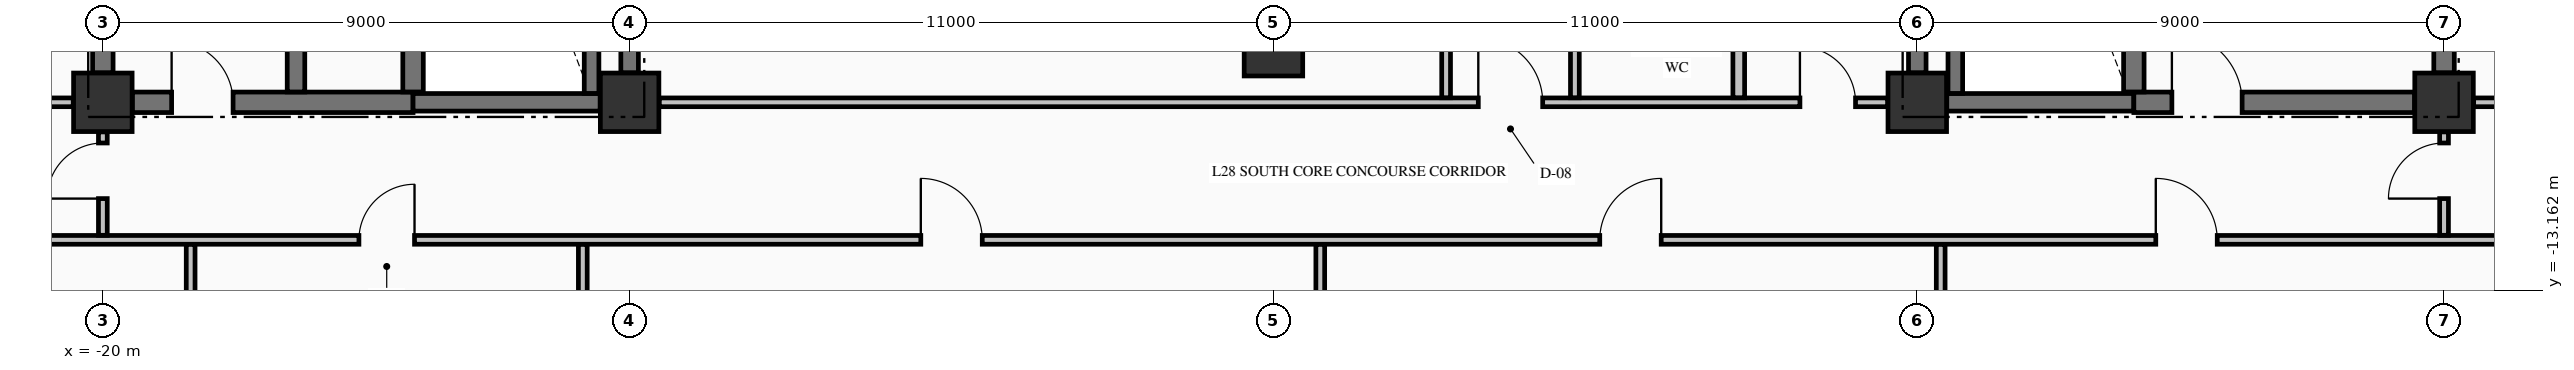
"""IFC4 building model, lengths in metres.
Left out: names, types, materials, properties, quantities, classifications, styles, units other than length and angle.
Written with IfcOpenShell. Run it as: python <this file> out.ifc"""

import sys

from ifc_helpers import new_model, si_unit, direction, frame, frame_2d, origin, origin_2d, place, context, subcontext, project, spatial, rectangle, extrude, element, fill, save


model = new_model("IFC4")
c1 = context("Model", 3, precision=1e-05, world=origin(), true_north=direction((0.0, 1.0)))
c2 = subcontext(c1, "Body", "Model", "MODEL_VIEW")
j1 = project(units=[si_unit("LENGTHUNIT", "METRE"), si_unit("PLANEANGLEUNIT", "RADIAN")], contexts=[c1])
p1 = place(None, origin())
s1 = spatial("IfcSite", under=j1, at=p1, CompositionType="ELEMENT")
p2 = place(p1, origin())
s2 = spatial("IfcBuilding", under=s1, at=p2, CompositionType="ELEMENT")
p3 = place(p2, frame((0.0, 0.0, 112.78)))
s3 = spatial("IfcBuildingStorey", under=s2, at=p3, CompositionType="ELEMENT", Elevation=112.78)
for number, where, z_axis, x_axis in (
    (1, (-20.0, -9.95, -0.25), (0.0, 0.0, 1.0), (1.0, 0.0, 0.0)),
    (2, (-11.0, -9.95, -0.25), (0.0, 0.0, 1.0), (1.0, 0.0, 0.0)),
    (3, (11.0, -9.95, -0.25), (0.0, 0.0, 1.0), (1.0, 0.0, 0.0)),
    (4, (20.0, -9.95, -0.25), (0.0, 0.0, 1.0), (1.0, 0.0, 0.0)),
    (5, (0.0, -9.0, -0.25), (0.0, 0.0, 1.0), (1.0, 0.0, 0.0)),
):
    element("IfcColumn", number, at=place(p3, frame(where, z_axis=z_axis, x_axis=x_axis)), inside=s3, PredefinedType="COLUMN", context=c2, shape_type="SweptSolid", body=[
        extrude(rectangle(XDim=1.0, YDim=1.0, at=origin_2d()), origin(), (0.0, 0.0, 1.0), 3.395),
    ])
p4 = place(p3, frame((-19.496, -9.95, 0.0), z_axis=(0.0, 0.0, 1.0), x_axis=(1.0, 0.0, 0.0)))
e6 = element("IfcWall", 6, at=p4, inside=s3, PredefinedType="SHEAR", context=c2, shape_type="SweptSolid", body=[
    extrude(rectangle(XDim=4.796, YDim=0.35, at=frame_2d((2.398, 0.0))), origin(), (0.0, 0.0, 1.0), 3.145),
])
p5 = place(p4, frame((0.671, 0.0, 0.0)))
e7 = element("IfcOpeningElement", 7, at=p5, cuts=e6, PredefinedType="OPENING", context=c2, shape_type="SweptSolid", body=[
    extrude(rectangle(XDim=1.05, YDim=2.15, at=frame_2d((0.525, 1.075))), frame((0.0, 0.185, 0.0), z_axis=(0.0, -1.0, 0.0), x_axis=(1.0, 0.0, 0.0)), (0.0, 0.0, 1.0), 0.37),
])
for number, where, z_axis, x_axis in (
    (8, (-14.7, -9.95, 0.0), (0.0, 0.0, 1.0), (1.0, 0.0, 0.0)),
    (9, (11.504, -9.95, 0.0), (0.0, 0.0, 1.0), (1.0, 0.0, 0.0)),
):
    element("IfcWall", number, at=place(p3, frame(where, z_axis=z_axis, x_axis=x_axis)), inside=s3, PredefinedType="SHEAR", context=c2, shape_type="SweptSolid", body=[
        extrude(rectangle(XDim=3.196, YDim=0.3, at=frame_2d((1.598, 0.0))), origin(), (0.0, 0.0, 1.0), 3.145),
    ])
p6 = place(p3, frame((14.7, -9.95, 0.0), z_axis=(0.0, 0.0, 1.0), x_axis=(1.0, 0.0, 0.0)))
e10 = element("IfcWall", 10, at=p6, inside=s3, PredefinedType="SHEAR", context=c2, shape_type="SweptSolid", body=[
    extrude(rectangle(XDim=4.796, YDim=0.35, at=frame_2d((2.398, 0.0))), origin(), (0.0, 0.0, 1.0), 3.145),
])
p7 = place(p6, frame((0.65, 0.0, 0.0)))
e11 = element("IfcOpeningElement", 11, at=p7, cuts=e10, PredefinedType="OPENING", context=c2, shape_type="SweptSolid", body=[
    extrude(rectangle(XDim=1.2, YDim=2.15, at=frame_2d((0.6, 1.075))), frame((0.0, 0.185, 0.0), z_axis=(0.0, -1.0, 0.0), x_axis=(1.0, 0.0, 0.0)), (0.0, 0.0, 1.0), 0.37),
])
p8 = place(p3, frame((-22.835, -12.3, 0.0), z_axis=(0.0, 0.0, 1.0), x_axis=(1.0, 0.0, 0.0)))
e12 = element("IfcWall", 12, at=p8, inside=s3, PredefinedType="PARTITIONING", context=c2, shape_type="SweptSolid", body=[
    extrude(rectangle(XDim=50.67, YDim=0.15, at=frame_2d((25.335, 0.0))), origin(), (0.0, 0.0, 1.0), 3.145),
])
p9 = place(p8, frame((7.21, 0.0, 0.0)))
e13 = element("IfcOpeningElement", 13, at=p9, cuts=e12, PredefinedType="OPENING", context=c2, shape_type="SweptSolid", body=[
    extrude(rectangle(XDim=0.95, YDim=2.15, at=frame_2d((0.475, 1.075))), frame((0.0, 0.085, 0.0), z_axis=(0.0, -1.0, 0.0), x_axis=(1.0, 0.0, 0.0)), (0.0, 0.0, 1.0), 0.17),
])
p10 = place(p8, frame((16.81, 0.0, 0.0)))
e14 = element("IfcOpeningElement", 14, at=p10, cuts=e12, PredefinedType="OPENING", context=c2, shape_type="SweptSolid", body=[
    extrude(rectangle(XDim=1.05, YDim=2.15, at=frame_2d((0.525, 1.075))), frame((0.0, 0.085, 0.0), z_axis=(0.0, -1.0, 0.0), x_axis=(1.0, 0.0, 0.0)), (0.0, 0.0, 1.0), 0.17),
])
p11 = place(p8, frame((28.41, 0.0, 0.0)))
e15 = element("IfcOpeningElement", 15, at=p11, cuts=e12, PredefinedType="OPENING", context=c2, shape_type="SweptSolid", body=[
    extrude(rectangle(XDim=1.05, YDim=2.15, at=frame_2d((0.525, 1.075))), frame((0.0, 0.085, 0.0), z_axis=(0.0, -1.0, 0.0), x_axis=(1.0, 0.0, 0.0)), (0.0, 0.0, 1.0), 0.17),
])
p12 = place(p8, frame((37.91, 0.0, 0.0)))
e16 = element("IfcOpeningElement", 16, at=p12, cuts=e12, PredefinedType="OPENING", context=c2, shape_type="SweptSolid", body=[
    extrude(rectangle(XDim=1.05, YDim=2.15, at=frame_2d((0.525, 1.075))), frame((0.0, 0.085, 0.0), z_axis=(0.0, -1.0, 0.0), x_axis=(1.0, 0.0, 0.0)), (0.0, 0.0, 1.0), 0.17),
])
p13 = place(p3, frame((-22.835, -9.95, 0.0), z_axis=(0.0, 0.0, 1.0), x_axis=(1.0, 0.0, 0.0)))
e17 = element("IfcWall", 17, at=p13, inside=s3, PredefinedType="PARTITIONING", context=c2, shape_type="SweptSolid", body=[
    extrude(rectangle(XDim=2.329, YDim=0.15, at=frame_2d((1.165, 0.0))), origin(), (0.0, 0.0, 1.0), 3.145),
])
p14 = place(p13, frame((0.86, 0.0, 0.0)))
e18 = element("IfcOpeningElement", 18, at=p14, cuts=e17, PredefinedType="OPENING", context=c2, shape_type="SweptSolid", body=[
    extrude(rectangle(XDim=0.95, YDim=2.15, at=frame_2d((0.475, 1.075))), frame((0.0, 0.085, 0.0), z_axis=(0.0, -1.0, 0.0), x_axis=(1.0, 0.0, 0.0)), (0.0, 0.0, 1.0), 0.17),
])
p15 = place(p3, frame((-10.494, -9.95, 0.0), z_axis=(0.0, 0.0, 1.0), x_axis=(1.0, 0.0, 0.0)))
e19 = element("IfcWall", 19, at=p15, inside=s3, PredefinedType="PARTITIONING", context=c2, shape_type="SweptSolid", body=[
    extrude(rectangle(XDim=20.988, YDim=0.15, at=frame_2d((10.494, 0.0))), origin(), (0.0, 0.0, 1.0), 3.145),
])
p16 = place(p15, frame((13.994, 0.0, 0.0)))
e20 = element("IfcOpeningElement", 20, at=p16, cuts=e19, PredefinedType="OPENING", context=c2, shape_type="SweptSolid", body=[
    extrude(rectangle(XDim=1.1, YDim=2.15, at=frame_2d((0.55, 1.075))), frame((0.0, 0.085, 0.0), z_axis=(0.0, -1.0, 0.0), x_axis=(1.0, 0.0, 0.0)), (0.0, 0.0, 1.0), 0.17),
])
p17 = place(p15, frame((19.489, 0.0, 0.0)))
e21 = element("IfcOpeningElement", 21, at=p17, cuts=e19, PredefinedType="OPENING", context=c2, shape_type="SweptSolid", body=[
    extrude(rectangle(XDim=0.95, YDim=2.15, at=frame_2d((0.475, 1.075))), frame((0.0, 0.085, 0.0), z_axis=(0.0, -1.0, 0.0), x_axis=(1.0, 0.0, 0.0)), (0.0, 0.0, 1.0), 0.17),
])
p18 = place(p3, frame((20.506, -9.95, 0.0), z_axis=(0.0, 0.0, 1.0), x_axis=(1.0, 0.0, 0.0)))
e22 = element("IfcWall", 22, at=p18, inside=s3, PredefinedType="PARTITIONING", context=c2, shape_type="SweptSolid", body=[
    extrude(rectangle(XDim=7.329, YDim=0.15, at=frame_2d((3.665, 0.0))), origin(), (0.0, 0.0, 1.0), 3.145),
])
p19 = place(p18, frame((2.994, 0.0, 0.0)))
e23 = element("IfcOpeningElement", 23, at=p19, cuts=e22, PredefinedType="OPENING", context=c2, shape_type="SweptSolid", body=[
    extrude(rectangle(XDim=1.0, YDim=2.15, at=frame_2d((0.5, 1.075))), frame((0.0, 0.085, 0.0), z_axis=(0.0, -1.0, 0.0), x_axis=(1.0, 0.0, 0.0)), (0.0, 0.0, 1.0), 0.17),
])
p20 = place(p3, frame((-20.0, -9.446, 0.0), z_axis=(0.0, 0.0, 1.0), x_axis=(0.0, 1.0, 0.0)))
e24 = element("IfcWall", 24, at=p20, inside=s3, PredefinedType="SHEAR", context=c2, shape_type="SweptSolid", body=[
    extrude(rectangle(XDim=8.942, YDim=0.35, at=frame_2d((4.471, 0.0))), origin(), (0.0, 0.0, 1.0), 3.145),
])
p21 = place(p3, frame((-16.7, -9.773, 0.0), z_axis=(0.0, 0.0, 1.0), x_axis=(0.0, 1.0, 0.0)))
e25 = element("IfcWall", 25, at=p21, inside=s3, PredefinedType="SHEAR", context=c2, shape_type="SweptSolid", body=[
    extrude(rectangle(XDim=9.371, YDim=0.3, at=frame_2d((4.686, 0.0))), origin(), (0.0, 0.0, 1.0), 3.145),
])
p22 = place(p3, frame((-14.7, -9.773, 0.0), z_axis=(0.0, 0.0, 1.0), x_axis=(0.0, 1.0, 0.0)))
e26 = element("IfcWall", 26, at=p22, inside=s3, PredefinedType="SHEAR", context=c2, shape_type="SweptSolid", body=[
    extrude(rectangle(XDim=9.371, YDim=0.35, at=frame_2d((4.686, 0.0))), origin(), (0.0, 0.0, 1.0), 3.145),
])
p23 = place(p3, frame((-11.65, -9.798, 0.0), z_axis=(0.0, 0.0, 1.0), x_axis=(0.0, 1.0, 0.0)))
e27 = element("IfcWall", 27, at=p23, inside=s3, PredefinedType="SOLIDWALL", context=c2, shape_type="SweptSolid", body=[
    extrude(rectangle(XDim=9.396, YDim=0.25, at=frame_2d((4.698, 0.0))), origin(), (0.0, 0.0, 1.0), 3.145),
])
for number, where, z_axis, x_axis in (
    (28, (-11.0, -9.446, 0.0), (0.0, 0.0, 1.0), (0.0, 1.0, 0.0)),
    (29, (11.0, -9.446, 0.0), (0.0, 0.0, 1.0), (0.0, 1.0, 0.0)),
):
    element("IfcWall", number, at=place(p3, frame(where, z_axis=z_axis, x_axis=x_axis)), inside=s3, PredefinedType="SHEAR", context=c2, shape_type="SweptSolid", body=[
        extrude(rectangle(XDim=8.942, YDim=0.3, at=frame_2d((4.471, 0.0))), origin(), (0.0, 0.0, 1.0), 3.145),
    ])
p24 = place(p3, frame((11.65, -9.798, 0.0), z_axis=(0.0, 0.0, 1.0), x_axis=(0.0, 1.0, 0.0)))
e30 = element("IfcWall", 30, at=p24, inside=s3, PredefinedType="SOLIDWALL", context=c2, shape_type="SweptSolid", body=[
    extrude(rectangle(XDim=9.396, YDim=0.25, at=frame_2d((4.698, 0.0))), origin(), (0.0, 0.0, 1.0), 3.145),
])
p25 = place(p3, frame((14.7, -9.773, 0.0), z_axis=(0.0, 0.0, 1.0), x_axis=(0.0, 1.0, 0.0)))
e31 = element("IfcWall", 31, at=p25, inside=s3, PredefinedType="SHEAR", context=c2, shape_type="SweptSolid", body=[
    extrude(rectangle(XDim=9.371, YDim=0.35, at=frame_2d((4.686, 0.0))), origin(), (0.0, 0.0, 1.0), 3.145),
])
p26 = place(p3, frame((20.0, -9.446, 0.0), z_axis=(0.0, 0.0, 1.0), x_axis=(0.0, 1.0, 0.0)))
e32 = element("IfcWall", 32, at=p26, inside=s3, PredefinedType="SHEAR", context=c2, shape_type="SweptSolid", body=[
    extrude(rectangle(XDim=2.269, YDim=0.35, at=frame_2d((1.135, 0.0))), origin(), (0.0, 0.0, 1.0), 3.145),
])
p27 = place(p3, frame((-20.0, -12.222, 0.0), z_axis=(0.0, 0.0, 1.0), x_axis=(0.0, 1.0, 0.0)))
e33 = element("IfcWall", 33, at=p27, inside=s3, PredefinedType="PARTITIONING", context=c2, shape_type="SweptSolid", body=[
    extrude(rectangle(XDim=1.766, YDim=0.15, at=frame_2d((0.883, 0.0))), origin(), (0.0, 0.0, 1.0), 2.635),
])
p28 = place(p27, frame((0.627, 0.0, 0.0)))
e34 = element("IfcOpeningElement", 34, at=p28, cuts=e33, PredefinedType="OPENING", context=c2, shape_type="SweptSolid", body=[
    extrude(rectangle(XDim=0.95, YDim=2.15, at=frame_2d((0.475, 1.075))), frame((0.0, 0.085, 0.0), z_axis=(0.0, -1.0, 0.0), x_axis=(1.0, 0.0, 0.0)), (0.0, 0.0, 1.0), 0.17),
])
p29 = place(p3, frame((-18.5, -20.394, 0.0), z_axis=(0.0, 0.0, 1.0), x_axis=(0.0, 1.0, 0.0)))
e35 = element("IfcWall", 35, at=p29, inside=s3, PredefinedType="PARTITIONING", context=c2, shape_type="SweptSolid", body=[
    extrude(rectangle(XDim=8.016, YDim=0.15, at=frame_2d((4.008, 0.0))), origin(), (0.0, 0.0, 1.0), 3.145),
])
for number, where, z_axis, x_axis in (
    (36, (-11.8, -25.335, 0.0), (0.0, 0.0, 1.0), (0.0, 1.0, 0.0)),
    (37, (0.8, -25.335, 0.0), (0.0, 0.0, 1.0), (0.0, 1.0, 0.0)),
):
    element("IfcWall", number, at=place(p3, frame(where, z_axis=z_axis, x_axis=x_axis)), inside=s3, PredefinedType="PARTITIONING", context=c2, shape_type="SweptSolid", body=[
        extrude(rectangle(XDim=12.957, YDim=0.15, at=frame_2d((6.479, 0.0))), origin(), (0.0, 0.0, 1.0), 3.145),
    ])
p30 = place(p3, frame((2.95, -9.872, 0.0), z_axis=(0.0, 0.0, 1.0), x_axis=(0.0, 1.0, 0.0)))
e38 = element("IfcWall", 38, at=p30, inside=s3, PredefinedType="PARTITIONING", context=c2, shape_type="SweptSolid", body=[
    extrude(rectangle(XDim=9.544, YDim=0.15, at=frame_2d((4.772, 0.0))), origin(), (0.0, 0.0, 1.0), 3.145),
])
p31 = place(p3, frame((5.15, -9.872, 0.0), z_axis=(0.0, 0.0, 1.0), x_axis=(0.0, 1.0, 0.0)))
e39 = element("IfcWall", 39, at=p31, inside=s3, PredefinedType="PARTITIONING", context=c2, shape_type="SweptSolid", body=[
    extrude(rectangle(XDim=4.919, YDim=0.15, at=frame_2d((2.459, 0.0))), origin(), (0.0, 0.0, 1.0), 3.145),
])
p32 = place(p31, frame((1.997, 0.0, 0.0)))
e40 = element("IfcOpeningElement", 40, at=p32, cuts=e39, PredefinedType="OPENING", context=c2, shape_type="SweptSolid", body=[
    extrude(rectangle(XDim=0.95, YDim=2.15, at=frame_2d((0.475, 1.075))), frame((0.0, 0.085, 0.0), z_axis=(0.0, -1.0, 0.0), x_axis=(1.0, 0.0, 0.0)), (0.0, 0.0, 1.0), 0.17),
])
p33 = place(p3, frame((7.95, -9.872, 0.0), z_axis=(0.0, 0.0, 1.0), x_axis=(0.0, 1.0, 0.0)))
e41 = element("IfcWall", 41, at=p33, inside=s3, PredefinedType="PARTITIONING", context=c2, shape_type="SweptSolid", body=[
    extrude(rectangle(XDim=4.919, YDim=0.2, at=frame_2d((2.459, 0.0))), origin(), (0.0, 0.0, 1.0), 3.145),
])
p34 = place(p3, frame((11.4, -24.894, 0.0), z_axis=(0.0, 0.0, 1.0), x_axis=(0.0, 1.0, 0.0)))
e42 = element("IfcWall", 42, at=p34, inside=s3, PredefinedType="PARTITIONING", context=c2, shape_type="SweptSolid", body=[
    extrude(rectangle(XDim=12.516, YDim=0.15, at=frame_2d((6.258, 0.0))), origin(), (0.0, 0.0, 1.0), 3.145),
])
p35 = place(p3, frame((20.0, -12.222, 0.0), z_axis=(0.0, 0.0, 1.0), x_axis=(0.0, 1.0, 0.0)))
e43 = element("IfcWall", 43, at=p35, inside=s3, PredefinedType="PARTITIONING", context=c2, shape_type="SweptSolid", body=[
    extrude(rectangle(XDim=1.766, YDim=0.15, at=frame_2d((0.883, 0.0))), origin(), (0.0, 0.0, 1.0), 2.635),
])
p36 = place(p35, frame((0.627, 0.0, 0.0)))
e44 = element("IfcOpeningElement", 44, at=p36, cuts=e43, PredefinedType="OPENING", context=c2, shape_type="SweptSolid", body=[
    extrude(rectangle(XDim=0.95, YDim=2.15, at=frame_2d((0.475, 1.075))), frame((0.0, 0.085, 0.0), z_axis=(0.0, -1.0, 0.0), x_axis=(1.0, 0.0, 0.0)), (0.0, 0.0, 1.0), 0.17),
])
p37 = place(p5, origin())
e45 = element("IfcDoor", 45, at=p37, inside=s3, OperationType="SINGLE_SWING_LEFT", PredefinedType="DOOR", context=c2, shape_type="SweptSolid", body=[
    extrude(rectangle(XDim=1.05, YDim=2.15, at=frame_2d((0.525, 1.075))), frame((0.0, 0.025, 0.0), z_axis=(0.0, -1.0, 0.0), x_axis=(1.0, 0.0, 0.0)), (0.0, 0.0, 1.0), 0.05),
])
fill(e7, e45)
p38 = place(p7, origin())
e46 = element("IfcDoor", 46, at=p38, inside=s3, OperationType="SINGLE_SWING_LEFT", PredefinedType="DOOR", context=c2, shape_type="SweptSolid", body=[
    extrude(rectangle(XDim=1.2, YDim=2.15, at=frame_2d((0.6, 1.075))), frame((0.0, 0.025, 0.0), z_axis=(0.0, -1.0, 0.0), x_axis=(1.0, 0.0, 0.0)), (0.0, 0.0, 1.0), 0.05),
])
fill(e11, e46)
p39 = place(p16, origin())
e47 = element("IfcDoor", 47, at=p39, inside=s3, OperationType="SINGLE_SWING_LEFT", PredefinedType="DOOR", context=c2, shape_type="SweptSolid", body=[
    extrude(rectangle(XDim=1.1, YDim=2.15, at=frame_2d((0.55, 1.075))), frame((0.0, 0.025, 0.0), z_axis=(0.0, -1.0, 0.0), x_axis=(1.0, 0.0, 0.0)), (0.0, 0.0, 1.0), 0.05),
])
fill(e20, e47)
p40 = place(p9, origin())
e48 = element("IfcDoor", 48, at=p40, inside=s3, OperationType="SINGLE_SWING_RIGHT", PredefinedType="DOOR", context=c2, shape_type="SweptSolid", body=[
    extrude(rectangle(XDim=0.95, YDim=2.15, at=frame_2d((0.475, 1.075))), frame((0.0, 0.025, 0.0), z_axis=(0.0, -1.0, 0.0), x_axis=(1.0, 0.0, 0.0)), (0.0, 0.0, 1.0), 0.05),
])
fill(e13, e48)
p41 = place(p10, origin())
e49 = element("IfcDoor", 49, at=p41, inside=s3, OperationType="SINGLE_SWING_LEFT", PredefinedType="DOOR", context=c2, shape_type="SweptSolid", body=[
    extrude(rectangle(XDim=1.05, YDim=2.15, at=frame_2d((0.525, 1.075))), frame((0.0, 0.025, 0.0), z_axis=(0.0, -1.0, 0.0), x_axis=(1.0, 0.0, 0.0)), (0.0, 0.0, 1.0), 0.05),
])
fill(e14, e49)
p42 = place(p11, origin())
e50 = element("IfcDoor", 50, at=p42, inside=s3, OperationType="SINGLE_SWING_RIGHT", PredefinedType="DOOR", context=c2, shape_type="SweptSolid", body=[
    extrude(rectangle(XDim=1.05, YDim=2.15, at=frame_2d((0.525, 1.075))), frame((0.0, 0.025, 0.0), z_axis=(0.0, -1.0, 0.0), x_axis=(1.0, 0.0, 0.0)), (0.0, 0.0, 1.0), 0.05),
])
fill(e15, e50)
p43 = place(p12, origin())
e51 = element("IfcDoor", 51, at=p43, inside=s3, OperationType="SINGLE_SWING_LEFT", PredefinedType="DOOR", context=c2, shape_type="SweptSolid", body=[
    extrude(rectangle(XDim=1.05, YDim=2.15, at=frame_2d((0.525, 1.075))), frame((0.0, 0.025, 0.0), z_axis=(0.0, -1.0, 0.0), x_axis=(1.0, 0.0, 0.0)), (0.0, 0.0, 1.0), 0.05),
])
fill(e16, e51)
p44 = place(p17, origin())
e52 = element("IfcDoor", 52, at=p44, inside=s3, OperationType="SINGLE_SWING_LEFT", PredefinedType="DOOR", context=c2, shape_type="SweptSolid", body=[
    extrude(rectangle(XDim=0.95, YDim=2.15, at=frame_2d((0.475, 1.075))), frame((0.0, 0.025, 0.0), z_axis=(0.0, -1.0, 0.0), x_axis=(1.0, 0.0, 0.0)), (0.0, 0.0, 1.0), 0.05),
])
fill(e21, e52)
p45 = place(p28, origin())
e53 = element("IfcDoor", 53, at=p45, inside=s3, OperationType="SINGLE_SWING_LEFT", PredefinedType="DOOR", context=c2, shape_type="SweptSolid", body=[
    extrude(rectangle(XDim=0.95, YDim=2.15, at=frame_2d((0.475, 1.075))), frame((0.0, 0.025, 0.0), z_axis=(0.0, -1.0, 0.0), x_axis=(1.0, 0.0, 0.0)), (0.0, 0.0, 1.0), 0.05),
])
fill(e34, e53)
p46 = place(p36, origin())
e54 = element("IfcDoor", 54, at=p46, inside=s3, OperationType="SINGLE_SWING_LEFT", PredefinedType="DOOR", context=c2, shape_type="SweptSolid", body=[
    extrude(rectangle(XDim=0.95, YDim=2.15, at=frame_2d((0.475, 1.075))), frame((0.0, 0.025, 0.0), z_axis=(0.0, -1.0, 0.0), x_axis=(1.0, 0.0, 0.0)), (0.0, 0.0, 1.0), 0.05),
])
fill(e44, e54)
save(model, sys.argv[1])
